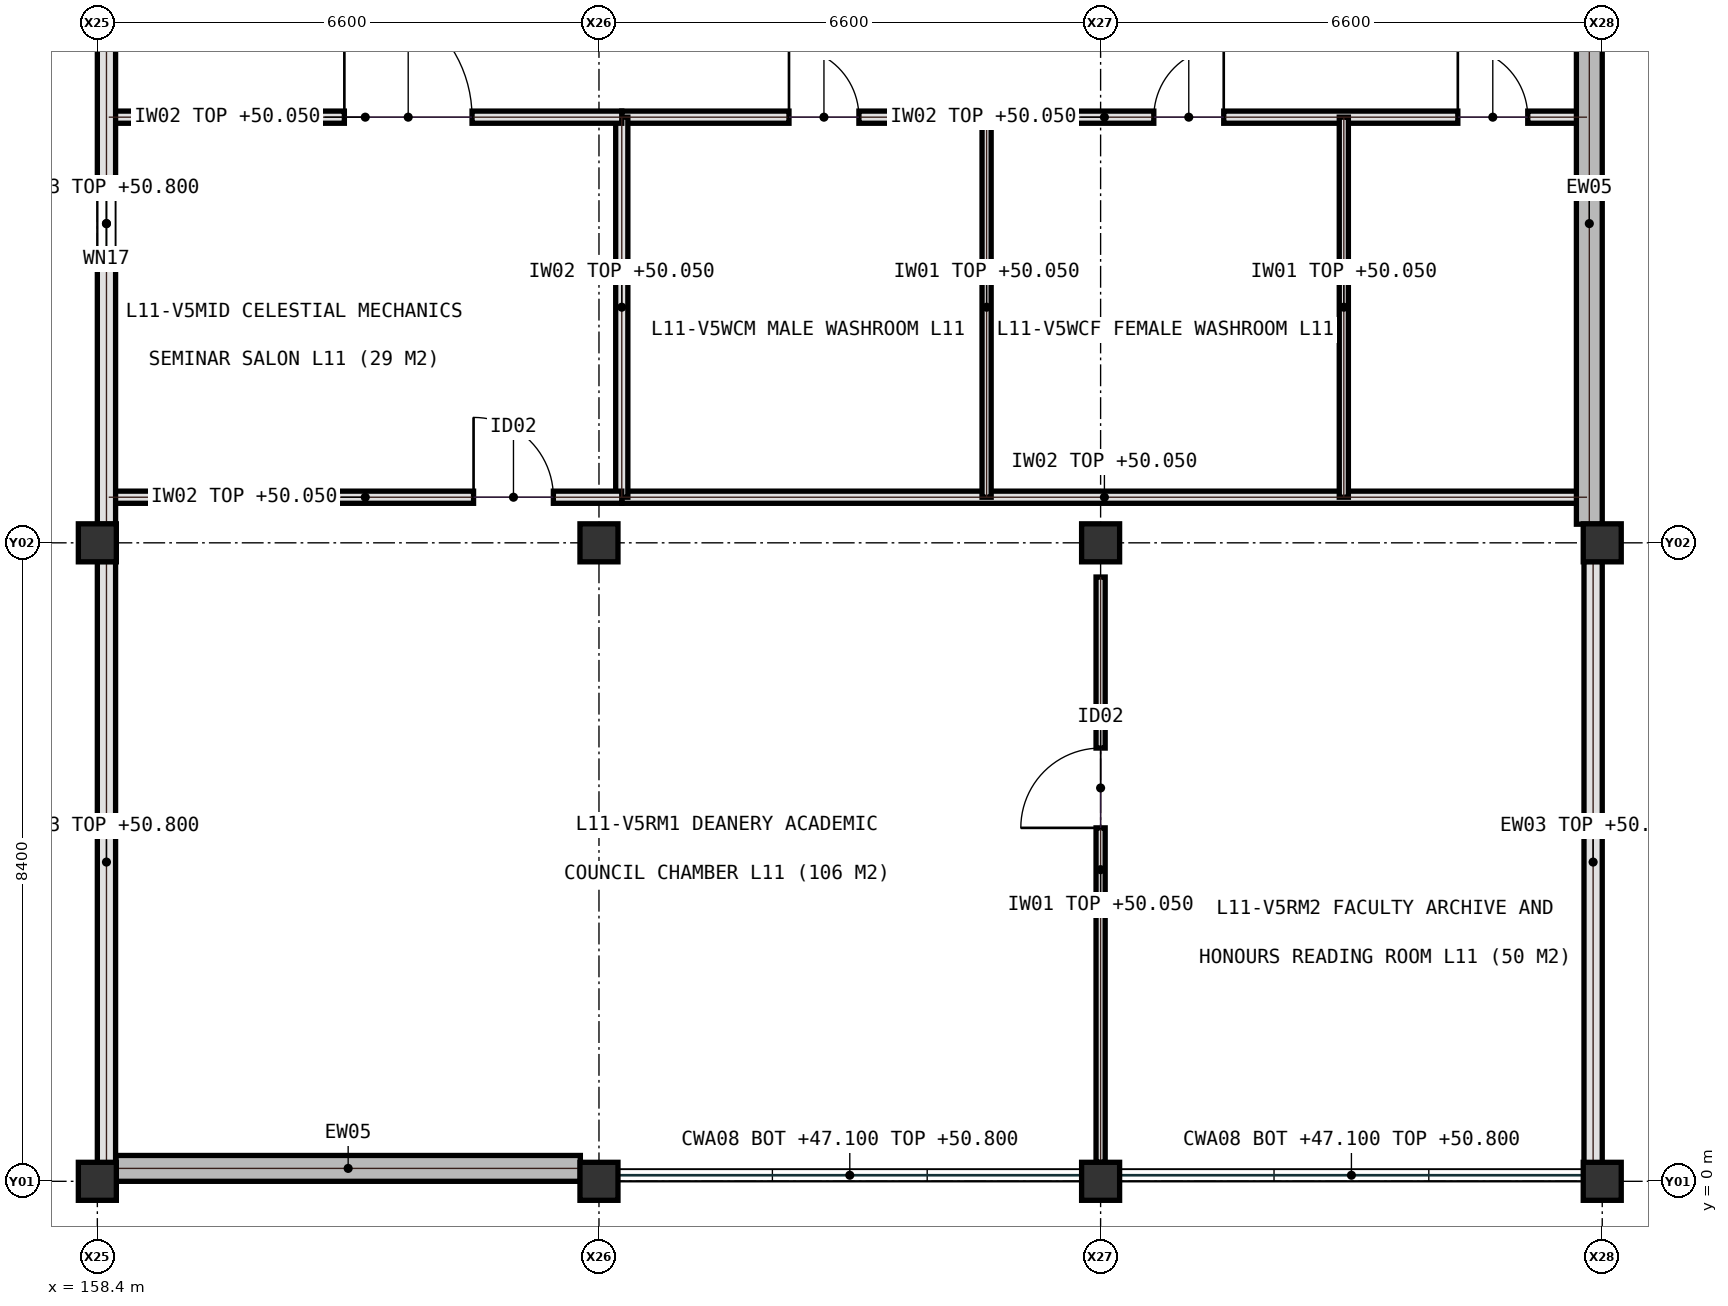
"""IFC4 building model, lengths in metres.
Left out: names, types, materials, properties, quantities, classifications, styles, units other than length and angle.
Written with IfcOpenShell. Run it as: python <this file> out.ifc"""

import sys

from ifc_helpers import new_model, si_unit, direction, frame, frame_2d, origin, origin_2d, place, context, subcontext, project, spatial, rectangle, extrude, element, fill, save


model = new_model("IFC4")
c1 = context("Model", 3, precision=1e-05, world=origin(), true_north=direction((0.0, 1.0)))
c2 = subcontext(c1, "Body", "Model", "MODEL_VIEW")
j1 = project(units=[si_unit("LENGTHUNIT", "METRE"), si_unit("PLANEANGLEUNIT", "RADIAN")], contexts=[c1])
p1 = place(None, origin())
s1 = spatial("IfcSite", under=j1, at=p1, CompositionType="ELEMENT")
p2 = place(p1, origin())
s2 = spatial("IfcBuilding", under=s1, at=p2, CompositionType="ELEMENT")
p3 = place(p2, frame((0.0, 0.0, 47.1)))
s3 = spatial("IfcBuildingStorey", under=s2, at=p3, CompositionType="ELEMENT", Elevation=47.1)
for number, where, z_axis, x_axis in (
    (1, (158.4, 0.0, 0.0), (0.0, 0.0, 1.0), (1.0, 0.0, 0.0)),
    (2, (158.4, 8.4, 0.0), (0.0, 0.0, 1.0), (1.0, 0.0, 0.0)),
):
    element("IfcColumn", number, at=place(p3, frame(where, z_axis=z_axis, x_axis=x_axis)), inside=s3, PredefinedType="COLUMN", context=c2, shape_type="SweptSolid", body=[
        extrude(rectangle(XDim=0.5, YDim=0.5, at=origin_2d()), origin(), (0.0, 0.0, 1.0), 3.9),
    ])
p4 = place(p3, frame((165.0, 0.0, 0.0), z_axis=(0.0, 0.0, 1.0), x_axis=(1.0, 0.0, 0.0)))
e3 = element("IfcColumn", 3, at=p4, inside=s3, PredefinedType="COLUMN", context=c2, shape_type="SweptSolid", body=[
    extrude(rectangle(XDim=0.5, YDim=0.5, at=origin_2d()), origin(), (0.0, 0.0, 1.0), 3.7),
])
p5 = place(p3, frame((165.0, 8.4, 0.0), z_axis=(0.0, 0.0, 1.0), x_axis=(1.0, 0.0, 0.0)))
e4 = element("IfcColumn", 4, at=p5, inside=s3, PredefinedType="COLUMN", context=c2, shape_type="SweptSolid", body=[
    extrude(rectangle(XDim=0.5, YDim=0.5, at=origin_2d()), origin(), (0.0, 0.0, 1.0), 3.91),
])
for number, where, z_axis, x_axis in (
    (5, (171.6, 0.0, 0.0), (0.0, 0.0, 1.0), (1.0, 0.0, 0.0)),
    (6, (171.6, 8.4, 0.0), (0.0, 0.0, 1.0), (1.0, 0.0, 0.0)),
    (7, (178.2, 0.0, 0.0), (0.0, 0.0, 1.0), (1.0, 0.0, 0.0)),
    (8, (178.2, 8.4, 0.0), (0.0, 0.0, 1.0), (1.0, 0.0, 0.0)),
):
    element("IfcColumn", number, at=place(p3, frame(where, z_axis=z_axis, x_axis=x_axis)), inside=s3, PredefinedType="COLUMN", context=c2, shape_type="SweptSolid", body=[
        extrude(rectangle(XDim=0.5, YDim=0.5, at=origin_2d()), origin(), (0.0, 0.0, 1.0), 3.9),
    ])
p6 = place(p3, frame((165.3, 14.0, 0.0), z_axis=(0.0, 0.0, 1.0), x_axis=(1.0, 0.0, 0.0)))
e9 = element("IfcWall", 9, at=p6, inside=s3, PredefinedType="PARTITIONING", context=c2, shape_type="SweptSolid", body=[
    extrude(rectangle(XDim=12.7, YDim=0.16, at=frame_2d((6.35, 0.0))), origin(), (0.0, 0.0, 1.0), 2.95),
])
p7 = place(p6, frame((2.2, 0.0, 0.0)))
e10 = element("IfcOpeningElement", 10, at=p7, cuts=e9, PredefinedType="OPENING", context=c2, shape_type="SweptSolid", body=[
    extrude(rectangle(XDim=0.92, YDim=2.08, at=frame_2d((0.46, 1.04))), frame((0.0, 0.09, 0.0), z_axis=(0.0, -1.0, 0.0), x_axis=(1.0, 0.0, 0.0)), (0.0, 0.0, 1.0), 0.18),
])
p8 = place(p6, frame((7.0, 0.0, 0.0)))
e11 = element("IfcOpeningElement", 11, at=p8, cuts=e9, PredefinedType="OPENING", context=c2, shape_type="SweptSolid", body=[
    extrude(rectangle(XDim=0.92, YDim=2.08, at=frame_2d((0.46, 1.04))), frame((0.0, 0.09, 0.0), z_axis=(0.0, -1.0, 0.0), x_axis=(1.0, 0.0, 0.0)), (0.0, 0.0, 1.0), 0.18),
])
p9 = place(p6, frame((11.0, 0.0, 0.0)))
e12 = element("IfcOpeningElement", 12, at=p9, cuts=e9, PredefinedType="OPENING", context=c2, shape_type="SweptSolid", body=[
    extrude(rectangle(XDim=0.92, YDim=2.08, at=frame_2d((0.46, 1.04))), frame((0.0, 0.09, 0.0), z_axis=(0.0, -1.0, 0.0), x_axis=(1.0, 0.0, 0.0)), (0.0, 0.0, 1.0), 0.18),
])
p10 = place(p3, frame((165.3, 9.0, 0.0), z_axis=(0.0, 0.0, 1.0), x_axis=(1.0, 0.0, 0.0)))
e13 = element("IfcWall", 13, at=p10, inside=s3, PredefinedType="PARTITIONING", context=c2, shape_type="SweptSolid", body=[
    extrude(rectangle(XDim=12.7, YDim=0.16, at=frame_2d((6.35, 0.0))), origin(), (0.0, 0.0, 1.0), 2.95),
])
p11 = place(p3, frame((165.3, 9.0, 0.0), z_axis=(0.0, 0.0, 1.0), x_axis=(0.0, 1.0, 0.0)))
e14 = element("IfcWall", 14, at=p11, inside=s3, PredefinedType="PARTITIONING", context=c2, shape_type="SweptSolid", body=[
    extrude(rectangle(XDim=5.0, YDim=0.16, at=frame_2d((2.5, 0.0))), origin(), (0.0, 0.0, 1.0), 2.95),
])
for number, where, z_axis, x_axis in (
    (15, (170.1, 9.0, 0.0), (0.0, 0.0, 1.0), (0.0, 1.0, 0.0)),
    (16, (174.8, 9.0, 0.0), (0.0, 0.0, 1.0), (0.0, 1.0, 0.0)),
):
    element("IfcWall", number, at=place(p3, frame(where, z_axis=z_axis, x_axis=x_axis)), inside=s3, PredefinedType="PARTITIONING", context=c2, shape_type="SweptSolid", body=[
        extrude(rectangle(XDim=5.0, YDim=0.12, at=frame_2d((2.5, 0.0))), origin(), (0.0, 0.0, 1.0), 2.95),
    ])
p12 = place(p3, frame((158.55, 9.0, 0.0), z_axis=(0.0, 0.0, 1.0), x_axis=(1.0, 0.0, 0.0)))
e17 = element("IfcWall", 17, at=p12, inside=s3, PredefinedType="PARTITIONING", context=c2, shape_type="SweptSolid", body=[
    extrude(rectangle(XDim=6.75, YDim=0.16, at=frame_2d((3.375, 0.0))), origin(), (0.0, 0.0, 1.0), 2.95),
])
p13 = place(p12, frame((4.8, 0.0, 0.0)))
e18 = element("IfcOpeningElement", 18, at=p13, cuts=e17, PredefinedType="OPENING", context=c2, shape_type="SweptSolid", body=[
    extrude(rectangle(XDim=1.05, YDim=2.15, at=frame_2d((0.525, 1.075))), frame((0.0, 0.09, 0.0), z_axis=(0.0, -1.0, 0.0), x_axis=(1.0, 0.0, 0.0)), (0.0, 0.0, 1.0), 0.18),
])
p14 = place(p3, frame((171.6, 0.25, 0.0), z_axis=(0.0, 0.0, 1.0), x_axis=(0.0, 1.0, 0.0)))
e19 = element("IfcWall", 19, at=p14, inside=s3, PredefinedType="PARTITIONING", context=c2, shape_type="SweptSolid", body=[
    extrude(rectangle(XDim=7.7, YDim=0.12, at=frame_2d((3.85, 0.0))), origin(), (0.0, 0.0, 1.0), 2.95),
])
p15 = place(p14, frame((4.4, 0.0, 0.0)))
e20 = element("IfcOpeningElement", 20, at=p15, cuts=e19, PredefinedType="OPENING", context=c2, shape_type="SweptSolid", body=[
    extrude(rectangle(XDim=1.05, YDim=2.15, at=frame_2d((0.525, 1.075))), frame((0.0, 0.07, 0.0), z_axis=(0.0, -1.0, 0.0), x_axis=(1.0, 0.0, 0.0)), (0.0, 0.0, 1.0), 0.14),
])
p16 = place(p3, frame((158.55, 14.0, 0.0), z_axis=(0.0, 0.0, 1.0), x_axis=(1.0, 0.0, 0.0)))
e21 = element("IfcWall", 21, at=p16, inside=s3, PredefinedType="PARTITIONING", context=c2, shape_type="SweptSolid", body=[
    extrude(rectangle(XDim=6.75, YDim=0.16, at=frame_2d((3.375, 0.0))), origin(), (0.0, 0.0, 1.0), 2.95),
])
p17 = place(p16, frame((3.1, 0.0, 0.0)))
e22 = element("IfcOpeningElement", 22, at=p17, cuts=e21, PredefinedType="OPENING", context=c2, shape_type="SweptSolid", body=[
    extrude(rectangle(XDim=1.68, YDim=2.28, at=frame_2d((0.84, 1.14))), frame((0.0, 0.09, 0.0), z_axis=(0.0, -1.0, 0.0), x_axis=(1.0, 0.0, 0.0)), (0.0, 0.0, 1.0), 0.18),
])
p18 = place(p3, frame((158.645, 0.17, 0.0), z_axis=(0.0, 0.0, 1.0), x_axis=(1.0, 0.0, 0.0)))
e23 = element("IfcWall", 23, at=p18, inside=s3, PredefinedType="SHEAR", context=c2, shape_type="SweptSolid", body=[
    extrude(rectangle(XDim=6.11, YDim=0.34, at=frame_2d((3.055, 0.0))), origin(), (0.0, 0.0, 1.0), 3.7),
])
p19 = place(p3, frame((158.52, 8.155, 0.0), z_axis=(0.0, 0.0, 1.0), x_axis=(0.0, -1.0, 0.0)))
e24 = element("IfcWall", 24, at=p19, inside=s3, PredefinedType="SOLIDWALL", context=c2, shape_type="SweptSolid", body=[
    extrude(rectangle(XDim=7.91, YDim=0.24, at=frame_2d((3.955, 0.0))), origin(), (0.0, 0.0, 1.0), 3.7),
])
p20 = place(p3, frame((158.52, 16.555, 0.0), z_axis=(0.0, 0.0, 1.0), x_axis=(0.0, -1.0, 0.0)))
e25 = element("IfcWall", 25, at=p20, inside=s3, PredefinedType="SOLIDWALL", context=c2, shape_type="SweptSolid", body=[
    extrude(rectangle(XDim=7.91, YDim=0.24, at=frame_2d((3.955, 0.0))), origin(), (0.0, 0.0, 1.0), 3.7),
])
p21 = place(p20, frame((3.43, 0.0, 0.95)))
e26 = element("IfcOpeningElement", 26, at=p21, cuts=e25, PredefinedType="OPENING", context=c2, shape_type="SweptSolid", body=[
    extrude(rectangle(XDim=1.05, YDim=1.75, at=frame_2d((0.525, 0.875))), frame((0.0, 0.13, 0.0), z_axis=(0.0, -1.0, 0.0), x_axis=(1.0, 0.0, 0.0)), (0.0, 0.0, 1.0), 0.26),
])
p22 = place(p3, frame((178.08, 0.245, 0.0), z_axis=(0.0, 0.0, 1.0), x_axis=(0.0, 1.0, 0.0)))
e27 = element("IfcWall", 27, at=p22, inside=s3, PredefinedType="SOLIDWALL", context=c2, shape_type="SweptSolid", body=[
    extrude(rectangle(XDim=7.91, YDim=0.24, at=frame_2d((3.955, 0.0))), origin(), (0.0, 0.0, 1.0), 3.7),
])
p23 = place(p3, frame((178.03, 8.645, 0.0), z_axis=(0.0, 0.0, 1.0), x_axis=(0.0, 1.0, 0.0)))
e28 = element("IfcWall", 28, at=p23, inside=s3, PredefinedType="SHEAR", context=c2, shape_type="SweptSolid", body=[
    extrude(rectangle(XDim=7.91, YDim=0.34, at=frame_2d((3.955, 0.0))), origin(), (0.0, 0.0, 1.0), 3.7),
])
p24 = place(p7, origin())
e29 = element("IfcDoor", 29, at=p24, inside=s3, OperationType="SINGLE_SWING_LEFT", PredefinedType="DOOR", context=c2, shape_type="SweptSolid", body=[
    extrude(rectangle(XDim=0.92, YDim=2.08, at=frame_2d((0.46, 1.04))), frame((0.0, 0.025, 0.0), z_axis=(0.0, -1.0, 0.0), x_axis=(1.0, 0.0, 0.0)), (0.0, 0.0, 1.0), 0.05),
])
fill(e10, e29)
p25 = place(p8, origin())
e30 = element("IfcDoor", 30, at=p25, inside=s3, OperationType="SINGLE_SWING_RIGHT", PredefinedType="DOOR", context=c2, shape_type="SweptSolid", body=[
    extrude(rectangle(XDim=0.92, YDim=2.08, at=frame_2d((0.46, 1.04))), frame((0.0, 0.025, 0.0), z_axis=(0.0, -1.0, 0.0), x_axis=(1.0, 0.0, 0.0)), (0.0, 0.0, 1.0), 0.05),
])
fill(e11, e30)
p26 = place(p9, origin())
e31 = element("IfcDoor", 31, at=p26, inside=s3, OperationType="SINGLE_SWING_LEFT", PredefinedType="DOOR", context=c2, shape_type="SweptSolid", body=[
    extrude(rectangle(XDim=0.92, YDim=2.08, at=frame_2d((0.46, 1.04))), frame((0.0, 0.025, 0.0), z_axis=(0.0, -1.0, 0.0), x_axis=(1.0, 0.0, 0.0)), (0.0, 0.0, 1.0), 0.05),
])
fill(e12, e31)
p27 = place(p13, origin())
e32 = element("IfcDoor", 32, at=p27, inside=s3, OperationType="SINGLE_SWING_LEFT", PredefinedType="DOOR", context=c2, shape_type="SweptSolid", body=[
    extrude(rectangle(XDim=1.05, YDim=2.15, at=frame_2d((0.525, 1.075))), frame((0.0, 0.025, 0.0), z_axis=(0.0, -1.0, 0.0), x_axis=(1.0, 0.0, 0.0)), (0.0, 0.0, 1.0), 0.05),
])
fill(e18, e32)
p28 = place(p15, origin())
e33 = element("IfcDoor", 33, at=p28, inside=s3, OperationType="SINGLE_SWING_LEFT", PredefinedType="DOOR", context=c2, shape_type="SweptSolid", body=[
    extrude(rectangle(XDim=1.05, YDim=2.15, at=frame_2d((0.525, 1.075))), frame((0.0, 0.025, 0.0), z_axis=(0.0, -1.0, 0.0), x_axis=(1.0, 0.0, 0.0)), (0.0, 0.0, 1.0), 0.05),
])
fill(e20, e33)
p29 = place(p17, origin())
e34 = element("IfcDoor", 34, at=p29, inside=s3, OperationType="SINGLE_SWING_LEFT", PredefinedType="DOOR", context=c2, shape_type="SweptSolid", body=[
    extrude(rectangle(XDim=1.68, YDim=2.28, at=frame_2d((0.84, 1.14))), frame((0.0, 0.025, 0.0), z_axis=(0.0, -1.0, 0.0), x_axis=(1.0, 0.0, 0.0)), (0.0, 0.0, 1.0), 0.05),
])
fill(e22, e34)
p30 = place(p21, origin())
e35 = element("IfcWindow", 35, at=p30, inside=s3, PartitioningType="SINGLE_PANEL", PredefinedType="WINDOW", context=c2, shape_type="SweptSolid", body=[
    extrude(rectangle(XDim=1.05, YDim=1.75, at=frame_2d((0.525, 0.875))), frame((0.0, 0.03, 0.0), z_axis=(0.0, -1.0, 0.0), x_axis=(1.0, 0.0, 0.0)), (0.0, 0.0, 1.0), 0.06),
])
fill(e26, e35)
save(model, sys.argv[1])
